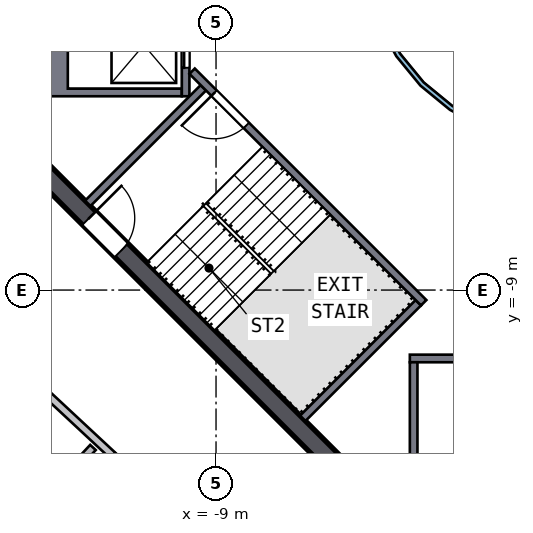
"""IFC4 building model, lengths in metres.
Left out: names, types, materials, properties, quantities, classifications, styles, units other than length and angle.
Written with IfcOpenShell. Run it as: python <this file> out.ifc"""

import sys

from ifc_helpers import new_model, si_unit, direction, frame, frame_2d, origin, place, context, subcontext, project, spatial, polyline, rectangle, outline, extrude, element, fill, save


model = new_model("IFC4")
c1 = context("Model", 3, precision=1e-05, world=origin(), true_north=direction((0.0, 1.0)))
c2 = subcontext(c1, "Body", "Model", "MODEL_VIEW")
j1 = project(units=[si_unit("LENGTHUNIT", "METRE"), si_unit("PLANEANGLEUNIT", "RADIAN")], contexts=[c1])
p1 = place(None, origin())
s1 = spatial("IfcSite", under=j1, at=p1, CompositionType="ELEMENT")
p2 = place(p1, origin())
s2 = spatial("IfcBuilding", under=s1, at=p2, CompositionType="ELEMENT")
p3 = place(p2, frame((0.0, 0.0, 227.0)))
s3 = spatial("IfcBuildingStorey", under=s2, at=p3, CompositionType="ELEMENT", Elevation=227.0)
p4 = place(p3, frame((-13.823, -5.622, 0.0), z_axis=(0.0, 0.0, 1.0), x_axis=(0.707106781, -0.707106781, 0.0)))
e1 = element("IfcWall", 1, at=p4, inside=s3, PredefinedType="SHEAR", context=c2, shape_type="SweptSolid", body=[
    extrude(rectangle(XDim=11.598, YDim=0.5, at=frame_2d((5.799, 0.0))), origin(), (0.0, 0.0, 1.0), 3.5),
])
p5 = place(p4, frame((2.099, 0.0, 0.0)))
e2 = element("IfcOpeningElement", 2, at=p5, cuts=e1, PredefinedType="OPENING", context=c2, shape_type="SweptSolid", body=[
    extrude(rectangle(XDim=1.2, YDim=2.1, at=frame_2d((0.6, 1.05))), frame((0.0, 0.26, 0.0), z_axis=(0.0, -1.0, 0.0), x_axis=(1.0, 0.0, 0.0)), (0.0, 0.0, 1.0), 0.52),
])
p6 = place(p3, origin())
e3 = element("IfcWall", 3, at=p6, inside=s3, PredefinedType="SOLIDWALL", context=c2, shape_type="SweptSolid", body=[
    extrude(outline(polyline([(-13.5, -3.9), (-13.5, -1.2), (-9.9, -1.2), (-9.9, -1.4), (-12.9, -1.4), (-12.9, -3.7), (-9.9, -3.7), (-9.9, -3.9), (-13.5, -3.9)])), origin(), (0.0, 0.0, 1.0), 3.19),
])
p7 = place(p3, frame((-9.8, -1.2, 0.0), z_axis=(0.0, 0.0, 1.0), x_axis=(0.0, -1.0, 0.0)))
e4 = element("IfcWall", 4, at=p7, inside=s3, PredefinedType="SOLIDWALL", context=c2, shape_type="SweptSolid", body=[
    extrude(rectangle(XDim=2.7, YDim=0.2, at=frame_2d((1.35, 0.0))), origin(), (0.0, 0.0, 1.0), 3.19),
])
p8 = place(p7, frame((0.75, 0.0, 0.0)))
e5 = element("IfcOpeningElement", 5, at=p8, cuts=e4, PredefinedType="OPENING", context=c2, shape_type="SweptSolid", body=[
    extrude(rectangle(XDim=1.2, YDim=2.1, at=frame_2d((0.6, 1.05))), frame((0.0, 0.11, 0.0), z_axis=(0.0, -1.0, 0.0), x_axis=(1.0, 0.0, 0.0)), (0.0, 0.0, 1.0), 0.22),
])
p9 = place(p3, frame((-3.9, -10.8, 0.0), z_axis=(0.0, 0.0, 1.0), x_axis=(1.0, 0.0, 0.0)))
e6 = element("IfcWall", 6, at=p9, inside=s3, PredefinedType="SOLIDWALL", context=c2, shape_type="SweptSolid", body=[
    extrude(rectangle(XDim=7.8, YDim=0.2, at=frame_2d((3.9, 0.0))), origin(), (0.0, 0.0, 1.0), 3.19),
])
p10 = place(p9, frame((3.45, 0.0, 0.0)))
e7 = element("IfcOpeningElement", 7, at=p10, cuts=e6, PredefinedType="OPENING", context=c2, shape_type="SweptSolid", body=[
    extrude(rectangle(XDim=0.9, YDim=2.1, at=frame_2d((0.45, 1.05))), frame((0.0, 0.11, 0.0), z_axis=(0.0, -1.0, 0.0), x_axis=(1.0, 0.0, 0.0)), (0.0, 0.0, 1.0), 0.22),
])
p11 = place(p3, frame((-3.8, -10.9, 0.0), z_axis=(0.0, 0.0, 1.0), x_axis=(0.0, -1.0, 0.0)))
e8 = element("IfcWall", 8, at=p11, inside=s3, PredefinedType="SOLIDWALL", context=c2, shape_type="SweptSolid", body=[
    extrude(rectangle(XDim=2.6, YDim=0.2, at=frame_2d((1.3, 0.0))), origin(), (0.0, 0.0, 1.0), 3.19),
])
p12 = place(p3, frame((-3.535, -9.334, 0.0), z_axis=(0.0, 0.0, 1.0), x_axis=(-0.707120946, 0.707092617, 0.0)))
e9 = element("IfcWall", 9, at=p12, inside=s3, PredefinedType="SOLIDWALL", context=c2, shape_type="SweptSolid", body=[
    extrude(rectangle(XDim=8.618, YDim=0.2, at=frame_2d((4.309, 0.0))), origin(), (0.0, 0.0, 1.0), 3.19),
])
p13 = place(p12, frame((6.6, 0.0, 0.0)))
e10 = element("IfcOpeningElement", 10, at=p13, cuts=e9, PredefinedType="OPENING", context=c2, shape_type="SweptSolid", body=[
    extrude(rectangle(XDim=1.2, YDim=2.1, at=frame_2d((0.6, 1.05))), frame((0.0, 0.11, 0.0), z_axis=(0.0, -1.0, 0.0), x_axis=(1.0, 0.0, 0.0)), (0.0, 0.0, 1.0), 0.22),
])
for number, where, z_axis, x_axis in (
    (11, (-9.334, -3.677, 0.0), (0.0, 0.0, 1.0), (-0.707, -0.707, 0.0)),
    (12, (-3.677, -9.334, 0.0), (0.0, 0.0, 1.0), (-0.707, -0.707, 0.0)),
):
    element("IfcWall", number, at=place(p3, frame(where, z_axis=z_axis, x_axis=x_axis)), inside=s3, PredefinedType="SOLIDWALL", context=c2, shape_type="SweptSolid", body=[
        extrude(rectangle(XDim=4.3, YDim=0.2, at=frame_2d((2.15, 0.0))), origin(), (0.0, 0.0, 1.0), 3.19),
    ])
p14 = place(p3, origin())
e13 = element("IfcWall", 13, at=p14, inside=s3, PredefinedType="SOLIDWALL", context=c2, shape_type="SweptSolid", body=[
    extrude(outline(polyline([(5.021, -0.999), (4.73, -1.959), (4.257, -2.844), (3.62, -3.62), (2.844, -4.257), (1.959, -4.73), (0.999, -5.021), (0.0, -5.12), (-0.999, -5.021), (-1.959, -4.73), (-2.844, -4.257), (-3.62, -3.62), (-4.257, -2.844), (-4.73, -1.959), (-5.021, -0.999), (-5.12, 0.0), (-5.021, 0.999), (-4.73, 1.959), (-4.257, 2.844), (-3.62, 3.62), (-2.844, 4.257), (-1.959, 4.73), (-0.999, 5.021), (0.0, 5.12), (0.999, 5.021), (1.959, 4.73), (2.844, 4.257), (3.62, 3.62), (4.257, 2.844), (4.73, 1.959), (5.021, 0.999), (5.12, 0.0), (5.021, -0.999)]), holes=[polyline([(4.904, 0.976), (4.619, 1.913), (4.157, 2.778), (3.535, 3.535), (2.778, 4.157), (1.913, 4.619), (0.976, 4.904), (0.0, 5.0), (-0.976, 4.904), (-1.913, 4.619), (-2.778, 4.157), (-3.535, 3.535), (-4.157, 2.778), (-4.619, 1.913), (-4.904, 0.976), (-5.0, 0.0), (-4.904, -0.976), (-4.619, -1.913), (-4.157, -2.778), (-3.535, -3.535), (-2.778, -4.157), (-1.913, -4.619), (-0.976, -4.904), (0.0, -5.0), (0.976, -4.904), (1.913, -4.619), (2.778, -4.157), (3.535, -3.535), (4.157, -2.778), (4.619, -1.913), (4.904, -0.976), (5.0, 0.0), (4.904, 0.976)])]), origin(), (0.0, 0.0, 1.0), 3.19),
])
p15 = place(p3, frame((-8.766, -16.103, 0.0), z_axis=(0.0, 0.0, 1.0), x_axis=(-0.731831338, 0.681485798, 0.0)))
e14 = element("IfcWall", 14, at=p15, inside=s3, PredefinedType="SOLIDWALL", context=c2, shape_type="SweptSolid", body=[
    extrude(rectangle(XDim=9.117, YDim=0.2, at=frame_2d((4.558, 0.0))), origin(), (0.0, 0.0, 1.0), 3.19),
])
p16 = place(p15, frame((3.05, 0.0, 0.0)))
e15 = element("IfcOpeningElement", 15, at=p16, cuts=e14, PredefinedType="OPENING", context=c2, shape_type="SweptSolid", body=[
    extrude(rectangle(XDim=1.0, YDim=2.1, at=frame_2d((0.5, 1.05))), frame((0.0, 0.11, 0.0), z_axis=(0.0, -1.0, 0.0), x_axis=(1.0, 0.0, 0.0)), (0.0, 0.0, 1.0), 0.22),
])
p17 = place(p3, frame((-12.238, -13.142, 0.0), z_axis=(0.0, 0.0, 1.0), x_axis=(-0.681483346, -0.731833621, 0.0)))
e16 = element("IfcWall", 16, at=p17, inside=s3, PredefinedType="SOLIDWALL", context=c2, shape_type="SweptSolid", body=[
    extrude(rectangle(XDim=3.2, YDim=0.2, at=frame_2d((1.6, 0.0))), origin(), (0.0, 0.0, 1.0), 3.19),
])
p18 = place(p8, origin())
e17 = element("IfcDoor", 17, at=p18, inside=s3, OperationType="DOUBLE_DOOR_SLIDING", PredefinedType="DOOR", context=c2, shape_type="SweptSolid", body=[
    extrude(rectangle(XDim=1.2, YDim=2.1, at=frame_2d((0.6, 1.05))), frame((0.0, 0.025, 0.0), z_axis=(0.0, -1.0, 0.0), x_axis=(1.0, 0.0, 0.0)), (0.0, 0.0, 1.0), 0.05),
])
fill(e5, e17)
p19 = place(p13, origin())
e18 = element("IfcDoor", 18, at=p19, inside=s3, OperationType="SINGLE_SWING_RIGHT", PredefinedType="DOOR", context=c2, shape_type="SweptSolid", body=[
    extrude(rectangle(XDim=1.2, YDim=2.1, at=frame_2d((0.6, 1.05))), frame((0.0, 0.025, 0.0), z_axis=(0.0, -1.0, 0.0), x_axis=(1.0, 0.0, 0.0)), (0.0, 0.0, 1.0), 0.05),
])
fill(e10, e18)
p20 = place(p5, origin())
e19 = element("IfcDoor", 19, at=p20, inside=s3, OperationType="SINGLE_SWING_LEFT", PredefinedType="DOOR", context=c2, shape_type="SweptSolid", body=[
    extrude(rectangle(XDim=1.2, YDim=2.1, at=frame_2d((0.6, 1.05))), frame((0.0, 0.025, 0.0), z_axis=(0.0, -1.0, 0.0), x_axis=(1.0, 0.0, 0.0)), (0.0, 0.0, 1.0), 0.05),
])
fill(e2, e19)
save(model, sys.argv[1])
